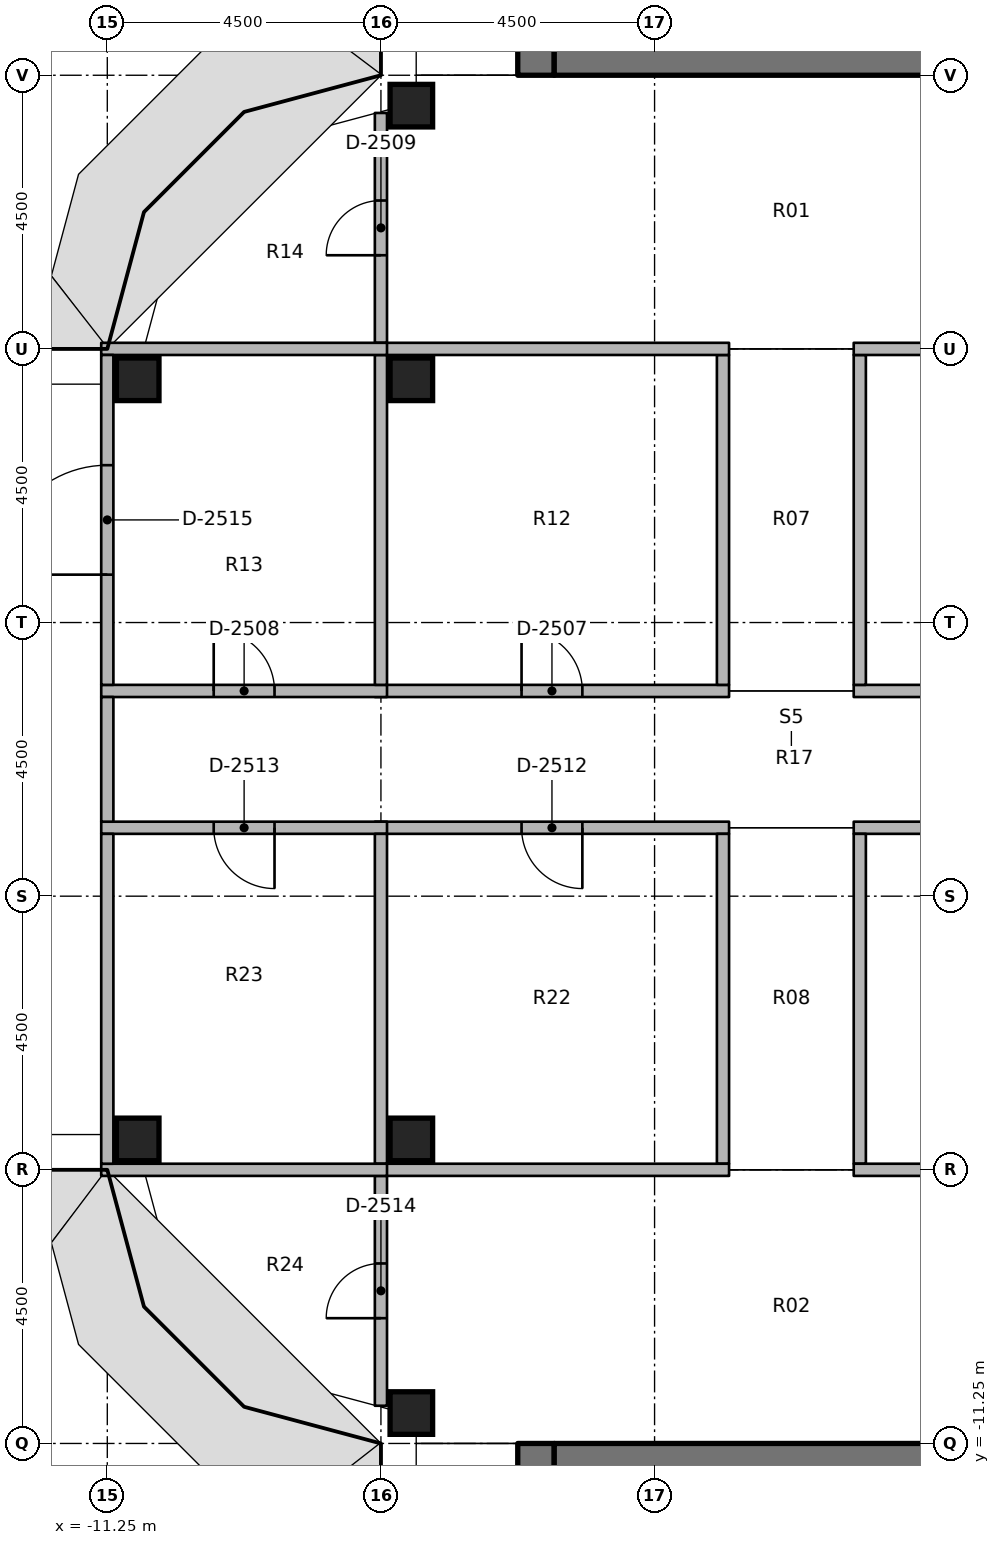
"""IFC4 building model, lengths in metres.
Left out: names, types, materials, properties, quantities, classifications, styles, units other than length and angle.
Written with IfcOpenShell. Run it as: python <this file> out.ifc"""

import sys

from ifc_helpers import new_model, si_unit, direction, frame, frame_2d, origin, origin_2d, place, context, subcontext, project, spatial, rectangle, extrude, element, fill, save


model = new_model("IFC4")
c1 = context("Model", 3, precision=1e-05, world=origin(), true_north=direction((0.0, 1.0)))
c2 = subcontext(c1, "Body", "Model", "MODEL_VIEW")
j1 = project(units=[si_unit("LENGTHUNIT", "METRE"), si_unit("PLANEANGLEUNIT", "RADIAN")], contexts=[c1])
p1 = place(None, origin())
s1 = spatial("IfcSite", under=j1, at=p1, CompositionType="ELEMENT")
p2 = place(p1, origin())
s2 = spatial("IfcBuilding", under=s1, at=p2, CompositionType="ELEMENT")
p3 = place(p2, frame((0.0, 0.0, 233.4)))
s3 = spatial("IfcBuildingStorey", under=s2, at=p3, CompositionType="ELEMENT", Elevation=233.4)
for number, where, z_axis, x_axis in (
    (1, (-10.75, -6.25, 0.0), (0.0, 0.0, 1.0), (1.0, 0.0, 0.0)),
    (2, (-10.75, 6.25, 0.0), (0.0, 0.0, 1.0), (1.0, 0.0, 0.0)),
    (3, (-6.25, -10.75, 0.0), (0.0, 0.0, 1.0), (1.0, 0.0, 0.0)),
    (4, (-6.25, -6.25, 0.0), (0.0, 0.0, 1.0), (1.0, 0.0, 0.0)),
    (5, (-6.25, 6.25, 0.0), (0.0, 0.0, 1.0), (1.0, 0.0, 0.0)),
    (6, (-6.25, 10.75, 0.0), (0.0, 0.0, 1.0), (1.0, 0.0, 0.0)),
):
    element("IfcColumn", number, at=place(p3, frame(where, z_axis=z_axis, x_axis=x_axis)), inside=s3, PredefinedType="COLUMN", context=c2, shape_type="SweptSolid", body=[
        extrude(rectangle(XDim=0.7, YDim=0.7, at=origin_2d()), origin(), (0.0, 0.0, 1.0), 3.65),
    ])
p4 = place(p3, frame((-4.2, 11.25, 0.0), z_axis=(0.0, 0.0, 1.0), x_axis=(0.0, 1.0, 0.0)))
e7 = element("IfcWall", 7, at=p4, inside=s3, PredefinedType="SHEAR", context=c2, shape_type="SweptSolid", body=[
    extrude(rectangle(XDim=15.0, YDim=0.6, at=frame_2d((7.5, 0.0))), origin(), (0.0, 0.0, 1.0), 3.8),
])
p5 = place(p4, frame((7.15, 0.0, 0.0)))
e8 = element("IfcOpeningElement", 8, at=p5, cuts=e7, PredefinedType="OPENING", context=c2, shape_type="SweptSolid", body=[
    extrude(rectangle(XDim=1.5, YDim=2.3, at=frame_2d((0.75, 1.15))), frame((0.0, 0.31, 0.0), z_axis=(0.0, -1.0, 0.0), x_axis=(1.0, 0.0, 0.0)), (0.0, 0.0, 1.0), 0.62),
])
p6 = place(p4, frame((13.9, 0.0, 0.0)))
e9 = element("IfcOpeningElement", 9, at=p6, cuts=e7, PredefinedType="OPENING", context=c2, shape_type="SweptSolid", body=[
    extrude(rectangle(XDim=0.9, YDim=2.1, at=frame_2d((0.45, 1.05))), frame((0.0, 0.31, 0.0), z_axis=(0.0, -1.0, 0.0), x_axis=(1.0, 0.0, 0.0)), (0.0, 0.0, 1.0), 0.62),
])
p7 = place(p4, frame((1.15, 0.0, 0.0)))
e10 = element("IfcOpeningElement", 10, at=p7, cuts=e7, PredefinedType="OPENING", context=c2, shape_type="SweptSolid", body=[
    extrude(rectangle(XDim=1.2, YDim=2.1, at=frame_2d((0.6, 1.05))), frame((0.0, 0.31, 0.0), z_axis=(0.0, -1.0, 0.0), x_axis=(1.0, 0.0, 0.0)), (0.0, 0.0, 1.0), 0.62),
])
p8 = place(p3, frame((-3.9, 11.55, 0.0), z_axis=(0.0, 0.0, 1.0), x_axis=(1.0, 0.0, 0.0)))
e11 = element("IfcWall", 11, at=p8, inside=s3, PredefinedType="SHEAR", context=c2, shape_type="SweptSolid", body=[
    extrude(rectangle(XDim=7.8, YDim=0.6, at=frame_2d((3.9, 0.0))), origin(), (0.0, 0.0, 1.0), 3.8),
])
p9 = place(p3, frame((-4.2, -11.25, 0.0), z_axis=(0.0, 0.0, 1.0), x_axis=(0.0, -1.0, 0.0)))
e12 = element("IfcWall", 12, at=p9, inside=s3, PredefinedType="SHEAR", context=c2, shape_type="SweptSolid", body=[
    extrude(rectangle(XDim=15.0, YDim=0.6, at=frame_2d((7.5, 0.0))), origin(), (0.0, 0.0, 1.0), 3.8),
])
p10 = place(p9, frame((7.15, 0.0, 0.0)))
e13 = element("IfcOpeningElement", 13, at=p10, cuts=e12, PredefinedType="OPENING", context=c2, shape_type="SweptSolid", body=[
    extrude(rectangle(XDim=1.5, YDim=2.3, at=frame_2d((0.75, 1.15))), frame((0.0, 0.31, 0.0), z_axis=(0.0, -1.0, 0.0), x_axis=(1.0, 0.0, 0.0)), (0.0, 0.0, 1.0), 0.62),
])
p11 = place(p9, frame((5.55, 0.0, 0.0)))
e14 = element("IfcOpeningElement", 14, at=p11, cuts=e12, PredefinedType="OPENING", context=c2, shape_type="SweptSolid", body=[
    extrude(rectangle(XDim=1.2, YDim=2.1, at=frame_2d((0.6, 1.05))), frame((0.0, 0.31, 0.0), z_axis=(0.0, -1.0, 0.0), x_axis=(1.0, 0.0, 0.0)), (0.0, 0.0, 1.0), 0.62),
])
p12 = place(p3, frame((-3.9, -11.55, 0.0), z_axis=(0.0, 0.0, 1.0), x_axis=(1.0, 0.0, 0.0)))
e15 = element("IfcWall", 15, at=p12, inside=s3, PredefinedType="SHEAR", context=c2, shape_type="SweptSolid", body=[
    extrude(rectangle(XDim=7.8, YDim=0.6, at=frame_2d((3.9, 0.0))), origin(), (0.0, 0.0, 1.0), 3.8),
])
p13 = place(p3, frame((1.025, 1.125, 0.0), z_axis=(0.0, 0.0, 1.0), x_axis=(1.0, 0.0, 0.0)))
e16 = element("IfcWall", 16, at=p13, inside=s3, PredefinedType="PARTITIONING", context=c2, shape_type="SweptSolid", body=[
    extrude(rectangle(XDim=5.825, YDim=0.2, at=frame_2d((2.913, 0.0))), origin(), (0.0, 0.0, 1.0), 2.746),
])
p14 = place(p13, frame((2.413, 0.0, 0.0)))
e17 = element("IfcOpeningElement", 17, at=p14, cuts=e16, PredefinedType="OPENING", context=c2, shape_type="SweptSolid", body=[
    extrude(rectangle(XDim=1.0, YDim=2.1, at=frame_2d((0.5, 1.05))), frame((0.0, 0.11, 0.0), z_axis=(0.0, -1.0, 0.0), x_axis=(1.0, 0.0, 0.0)), (0.0, 0.0, 1.0), 0.22),
])
p15 = place(p3, frame((-6.85, 1.125, 0.0), z_axis=(0.0, 0.0, 1.0), x_axis=(1.0, 0.0, 0.0)))
e18 = element("IfcWall", 18, at=p15, inside=s3, PredefinedType="PARTITIONING", context=c2, shape_type="SweptSolid", body=[
    extrude(rectangle(XDim=5.825, YDim=0.2, at=frame_2d((2.913, 0.0))), origin(), (0.0, 0.0, 1.0), 2.746),
])
p16 = place(p15, frame((2.413, 0.0, 0.0)))
e19 = element("IfcOpeningElement", 19, at=p16, cuts=e18, PredefinedType="OPENING", context=c2, shape_type="SweptSolid", body=[
    extrude(rectangle(XDim=1.0, YDim=2.1, at=frame_2d((0.5, 1.05))), frame((0.0, 0.11, 0.0), z_axis=(0.0, -1.0, 0.0), x_axis=(1.0, 0.0, 0.0)), (0.0, 0.0, 1.0), 0.22),
])
p17 = place(p3, frame((-11.35, 1.125, 0.0), z_axis=(0.0, 0.0, 1.0), x_axis=(1.0, 0.0, 0.0)))
e20 = element("IfcWall", 20, at=p17, inside=s3, PredefinedType="PARTITIONING", context=c2, shape_type="SweptSolid", body=[
    extrude(rectangle(XDim=4.7, YDim=0.2, at=frame_2d((2.35, 0.0))), origin(), (0.0, 0.0, 1.0), 2.746),
])
p18 = place(p17, frame((1.85, 0.0, 0.0)))
e21 = element("IfcOpeningElement", 21, at=p18, cuts=e20, PredefinedType="OPENING", context=c2, shape_type="SweptSolid", body=[
    extrude(rectangle(XDim=1.0, YDim=2.1, at=frame_2d((0.5, 1.05))), frame((0.0, 0.11, 0.0), z_axis=(0.0, -1.0, 0.0), x_axis=(1.0, 0.0, 0.0)), (0.0, 0.0, 1.0), 0.22),
])
p19 = place(p3, frame((6.85, -1.125, 0.0), z_axis=(0.0, 0.0, 1.0), x_axis=(-1.0, 0.0, 0.0)))
e22 = element("IfcWall", 22, at=p19, inside=s3, PredefinedType="PARTITIONING", context=c2, shape_type="SweptSolid", body=[
    extrude(rectangle(XDim=5.825, YDim=0.2, at=frame_2d((2.913, 0.0))), origin(), (0.0, 0.0, 1.0), 2.746),
])
p20 = place(p19, frame((2.413, 0.0, 0.0)))
e23 = element("IfcOpeningElement", 23, at=p20, cuts=e22, PredefinedType="OPENING", context=c2, shape_type="SweptSolid", body=[
    extrude(rectangle(XDim=1.0, YDim=2.1, at=frame_2d((0.5, 1.05))), frame((0.0, 0.11, 0.0), z_axis=(0.0, -1.0, 0.0), x_axis=(1.0, 0.0, 0.0)), (0.0, 0.0, 1.0), 0.22),
])
p21 = place(p3, frame((-1.025, -1.125, 0.0), z_axis=(0.0, 0.0, 1.0), x_axis=(-1.0, 0.0, 0.0)))
e24 = element("IfcWall", 24, at=p21, inside=s3, PredefinedType="PARTITIONING", context=c2, shape_type="SweptSolid", body=[
    extrude(rectangle(XDim=5.825, YDim=0.2, at=frame_2d((2.913, 0.0))), origin(), (0.0, 0.0, 1.0), 2.746),
])
p22 = place(p21, frame((2.413, 0.0, 0.0)))
e25 = element("IfcOpeningElement", 25, at=p22, cuts=e24, PredefinedType="OPENING", context=c2, shape_type="SweptSolid", body=[
    extrude(rectangle(XDim=1.0, YDim=2.1, at=frame_2d((0.5, 1.05))), frame((0.0, 0.11, 0.0), z_axis=(0.0, -1.0, 0.0), x_axis=(1.0, 0.0, 0.0)), (0.0, 0.0, 1.0), 0.22),
])
p23 = place(p3, frame((-6.65, -1.125, 0.0), z_axis=(0.0, 0.0, 1.0), x_axis=(-1.0, 0.0, 0.0)))
e26 = element("IfcWall", 26, at=p23, inside=s3, PredefinedType="PARTITIONING", context=c2, shape_type="SweptSolid", body=[
    extrude(rectangle(XDim=4.7, YDim=0.2, at=frame_2d((2.35, 0.0))), origin(), (0.0, 0.0, 1.0), 2.746),
])
p24 = place(p23, frame((1.85, 0.0, 0.0)))
e27 = element("IfcOpeningElement", 27, at=p24, cuts=e26, PredefinedType="OPENING", context=c2, shape_type="SweptSolid", body=[
    extrude(rectangle(XDim=1.0, YDim=2.1, at=frame_2d((0.5, 1.05))), frame((0.0, 0.11, 0.0), z_axis=(0.0, -1.0, 0.0), x_axis=(1.0, 0.0, 0.0)), (0.0, 0.0, 1.0), 0.22),
])
p25 = place(p3, frame((-11.25, -1.025, 0.0), z_axis=(0.0, 0.0, 1.0), x_axis=(0.0, 1.0, 0.0)))
e28 = element("IfcWall", 28, at=p25, inside=s3, PredefinedType="PARTITIONING", context=c2, shape_type="SweptSolid", body=[
    extrude(rectangle(XDim=2.05, YDim=0.2, at=frame_2d((1.025, 0.0))), origin(), (0.0, 0.0, 1.0), 2.746),
])
for number, where, z_axis, x_axis in (
    (29, (1.125, 1.225, 0.0), (0.0, 0.0, 1.0), (0.0, 1.0, 0.0)),
    (30, (-1.125, 1.225, 0.0), (0.0, 0.0, 1.0), (0.0, 1.0, 0.0)),
    (31, (1.125, -6.65, 0.0), (0.0, 0.0, 1.0), (0.0, 1.0, 0.0)),
    (32, (-1.125, -6.65, 0.0), (0.0, 0.0, 1.0), (0.0, 1.0, 0.0)),
):
    element("IfcWall", number, at=place(p3, frame(where, z_axis=z_axis, x_axis=x_axis)), inside=s3, PredefinedType="PARTITIONING", context=c2, shape_type="SweptSolid", body=[
        extrude(rectangle(XDim=5.425, YDim=0.2, at=frame_2d((2.712, 0.0))), origin(), (0.0, 0.0, 1.0), 2.746),
    ])
for number, where, z_axis, x_axis in (
    (33, (1.025, 6.75, 0.0), (0.0, 0.0, 1.0), (1.0, 0.0, 0.0)),
    (34, (-6.85, 6.75, 0.0), (0.0, 0.0, 1.0), (1.0, 0.0, 0.0)),
):
    element("IfcWall", number, at=place(p3, frame(where, z_axis=z_axis, x_axis=x_axis)), inside=s3, PredefinedType="PARTITIONING", context=c2, shape_type="SweptSolid", body=[
        extrude(rectangle(XDim=5.825, YDim=0.2, at=frame_2d((2.913, 0.0))), origin(), (0.0, 0.0, 1.0), 2.746),
    ])
p26 = place(p3, frame((-6.75, 6.85, 0.0), z_axis=(0.0, 0.0, 1.0), x_axis=(0.0, 1.0, 0.0)))
e35 = element("IfcWall", 35, at=p26, inside=s3, PredefinedType="PARTITIONING", context=c2, shape_type="SweptSolid", body=[
    extrude(rectangle(XDim=3.78, YDim=0.2, at=frame_2d((1.89, 0.0))), origin(), (0.0, 0.0, 1.0), 2.746),
])
p27 = place(p26, frame((1.44, 0.0, 0.0)))
e36 = element("IfcOpeningElement", 36, at=p27, cuts=e35, PredefinedType="OPENING", context=c2, shape_type="SweptSolid", body=[
    extrude(rectangle(XDim=0.9, YDim=2.1, at=frame_2d((0.45, 1.05))), frame((0.0, 0.11, 0.0), z_axis=(0.0, -1.0, 0.0), x_axis=(1.0, 0.0, 0.0)), (0.0, 0.0, 1.0), 0.22),
])
for number, where, z_axis, x_axis in (
    (37, (1.025, -6.75, 0.0), (0.0, 0.0, 1.0), (1.0, 0.0, 0.0)),
    (38, (-6.85, -6.75, 0.0), (0.0, 0.0, 1.0), (1.0, 0.0, 0.0)),
):
    element("IfcWall", number, at=place(p3, frame(where, z_axis=z_axis, x_axis=x_axis)), inside=s3, PredefinedType="PARTITIONING", context=c2, shape_type="SweptSolid", body=[
        extrude(rectangle(XDim=5.825, YDim=0.2, at=frame_2d((2.913, 0.0))), origin(), (0.0, 0.0, 1.0), 2.746),
    ])
p28 = place(p3, frame((-6.75, -10.63, 0.0), z_axis=(0.0, 0.0, 1.0), x_axis=(0.0, 1.0, 0.0)))
e39 = element("IfcWall", 39, at=p28, inside=s3, PredefinedType="PARTITIONING", context=c2, shape_type="SweptSolid", body=[
    extrude(rectangle(XDim=3.78, YDim=0.2, at=frame_2d((1.89, 0.0))), origin(), (0.0, 0.0, 1.0), 2.746),
])
p29 = place(p28, frame((1.44, 0.0, 0.0)))
e40 = element("IfcOpeningElement", 40, at=p29, cuts=e39, PredefinedType="OPENING", context=c2, shape_type="SweptSolid", body=[
    extrude(rectangle(XDim=0.9, YDim=2.1, at=frame_2d((0.45, 1.05))), frame((0.0, 0.11, 0.0), z_axis=(0.0, -1.0, 0.0), x_axis=(1.0, 0.0, 0.0)), (0.0, 0.0, 1.0), 0.22),
])
p30 = place(p3, frame((-6.75, 1.225, 0.0), z_axis=(0.0, 0.0, 1.0), x_axis=(0.0, 1.0, 0.0)))
e41 = element("IfcWall", 41, at=p30, inside=s3, PredefinedType="PARTITIONING", context=c2, shape_type="SweptSolid", body=[
    extrude(rectangle(XDim=5.425, YDim=0.2, at=frame_2d((2.712, 0.0))), origin(), (0.0, 0.0, 1.0), 2.746),
])
p31 = place(p3, frame((-11.35, 6.75, 0.0), z_axis=(0.0, 0.0, 1.0), x_axis=(1.0, 0.0, 0.0)))
e42 = element("IfcWall", 42, at=p31, inside=s3, PredefinedType="PARTITIONING", context=c2, shape_type="SweptSolid", body=[
    extrude(rectangle(XDim=4.7, YDim=0.2, at=frame_2d((2.35, 0.0))), origin(), (0.0, 0.0, 1.0), 2.746),
])
p32 = place(p3, frame((-11.25, 1.225, 0.0), z_axis=(0.0, 0.0, 1.0), x_axis=(0.0, 1.0, 0.0)))
e43 = element("IfcWall", 43, at=p32, inside=s3, PredefinedType="PARTITIONING", context=c2, shape_type="SweptSolid", body=[
    extrude(rectangle(XDim=5.425, YDim=0.2, at=frame_2d((2.712, 0.0))), origin(), (0.0, 0.0, 1.0), 2.746),
])
p33 = place(p32, frame((1.812, 0.0, 0.0)))
e44 = element("IfcOpeningElement", 44, at=p33, cuts=e43, PredefinedType="OPENING", context=c2, shape_type="SweptSolid", body=[
    extrude(rectangle(XDim=1.8, YDim=2.1, at=frame_2d((0.9, 1.05))), frame((0.0, 0.11, 0.0), z_axis=(0.0, -1.0, 0.0), x_axis=(1.0, 0.0, 0.0)), (0.0, 0.0, 1.0), 0.22),
])
p34 = place(p3, frame((-6.75, -6.65, 0.0), z_axis=(0.0, 0.0, 1.0), x_axis=(0.0, 1.0, 0.0)))
e45 = element("IfcWall", 45, at=p34, inside=s3, PredefinedType="PARTITIONING", context=c2, shape_type="SweptSolid", body=[
    extrude(rectangle(XDim=5.425, YDim=0.2, at=frame_2d((2.712, 0.0))), origin(), (0.0, 0.0, 1.0), 2.746),
])
p35 = place(p3, frame((-11.35, -6.75, 0.0), z_axis=(0.0, 0.0, 1.0), x_axis=(1.0, 0.0, 0.0)))
e46 = element("IfcWall", 46, at=p35, inside=s3, PredefinedType="PARTITIONING", context=c2, shape_type="SweptSolid", body=[
    extrude(rectangle(XDim=4.7, YDim=0.2, at=frame_2d((2.35, 0.0))), origin(), (0.0, 0.0, 1.0), 2.746),
])
p36 = place(p3, frame((-11.25, -6.65, 0.0), z_axis=(0.0, 0.0, 1.0), x_axis=(0.0, 1.0, 0.0)))
e47 = element("IfcWall", 47, at=p36, inside=s3, PredefinedType="PARTITIONING", context=c2, shape_type="SweptSolid", body=[
    extrude(rectangle(XDim=5.425, YDim=0.2, at=frame_2d((2.712, 0.0))), origin(), (0.0, 0.0, 1.0), 2.746),
])
p37 = place(p16, origin())
e48 = element("IfcDoor", 48, at=p37, inside=s3, OperationType="SINGLE_SWING_RIGHT", PredefinedType="DOOR", context=c2, shape_type="SweptSolid", body=[
    extrude(rectangle(XDim=1.0, YDim=2.1, at=frame_2d((0.5, 1.05))), frame((0.0, 0.025, 0.0), z_axis=(0.0, -1.0, 0.0), x_axis=(1.0, 0.0, 0.0)), (0.0, 0.0, 1.0), 0.05),
])
fill(e19, e48)
p38 = place(p18, origin())
e49 = element("IfcDoor", 49, at=p38, inside=s3, OperationType="SINGLE_SWING_RIGHT", PredefinedType="DOOR", context=c2, shape_type="SweptSolid", body=[
    extrude(rectangle(XDim=1.0, YDim=2.1, at=frame_2d((0.5, 1.05))), frame((0.0, 0.025, 0.0), z_axis=(0.0, -1.0, 0.0), x_axis=(1.0, 0.0, 0.0)), (0.0, 0.0, 1.0), 0.05),
])
fill(e21, e49)
p39 = place(p27, origin())
e50 = element("IfcDoor", 50, at=p39, inside=s3, OperationType="SINGLE_SWING_LEFT", PredefinedType="DOOR", context=c2, shape_type="SweptSolid", body=[
    extrude(rectangle(XDim=0.9, YDim=2.1, at=frame_2d((0.45, 1.05))), frame((0.0, 0.025, 0.0), z_axis=(0.0, -1.0, 0.0), x_axis=(1.0, 0.0, 0.0)), (0.0, 0.0, 1.0), 0.05),
])
fill(e36, e50)
p40 = place(p22, origin())
e51 = element("IfcDoor", 51, at=p40, inside=s3, OperationType="SINGLE_SWING_RIGHT", PredefinedType="DOOR", context=c2, shape_type="SweptSolid", body=[
    extrude(rectangle(XDim=1.0, YDim=2.1, at=frame_2d((0.5, 1.05))), frame((0.0, 0.025, 0.0), z_axis=(0.0, -1.0, 0.0), x_axis=(1.0, 0.0, 0.0)), (0.0, 0.0, 1.0), 0.05),
])
fill(e25, e51)
p41 = place(p24, origin())
e52 = element("IfcDoor", 52, at=p41, inside=s3, OperationType="SINGLE_SWING_RIGHT", PredefinedType="DOOR", context=c2, shape_type="SweptSolid", body=[
    extrude(rectangle(XDim=1.0, YDim=2.1, at=frame_2d((0.5, 1.05))), frame((0.0, 0.025, 0.0), z_axis=(0.0, -1.0, 0.0), x_axis=(1.0, 0.0, 0.0)), (0.0, 0.0, 1.0), 0.05),
])
fill(e27, e52)
p42 = place(p29, origin())
e53 = element("IfcDoor", 53, at=p42, inside=s3, OperationType="SINGLE_SWING_RIGHT", PredefinedType="DOOR", context=c2, shape_type="SweptSolid", body=[
    extrude(rectangle(XDim=0.9, YDim=2.1, at=frame_2d((0.45, 1.05))), frame((0.0, 0.025, 0.0), z_axis=(0.0, -1.0, 0.0), x_axis=(1.0, 0.0, 0.0)), (0.0, 0.0, 1.0), 0.05),
])
fill(e40, e53)
p43 = place(p33, origin())
e54 = element("IfcDoor", 54, at=p43, inside=s3, OperationType="DOUBLE_DOOR_SINGLE_SWING", PredefinedType="DOOR", context=c2, shape_type="SweptSolid", body=[
    extrude(rectangle(XDim=1.8, YDim=2.1, at=frame_2d((0.9, 1.05))), frame((0.0, 0.025, 0.0), z_axis=(0.0, -1.0, 0.0), x_axis=(1.0, 0.0, 0.0)), (0.0, 0.0, 1.0), 0.05),
])
fill(e44, e54)
save(model, sys.argv[1])
